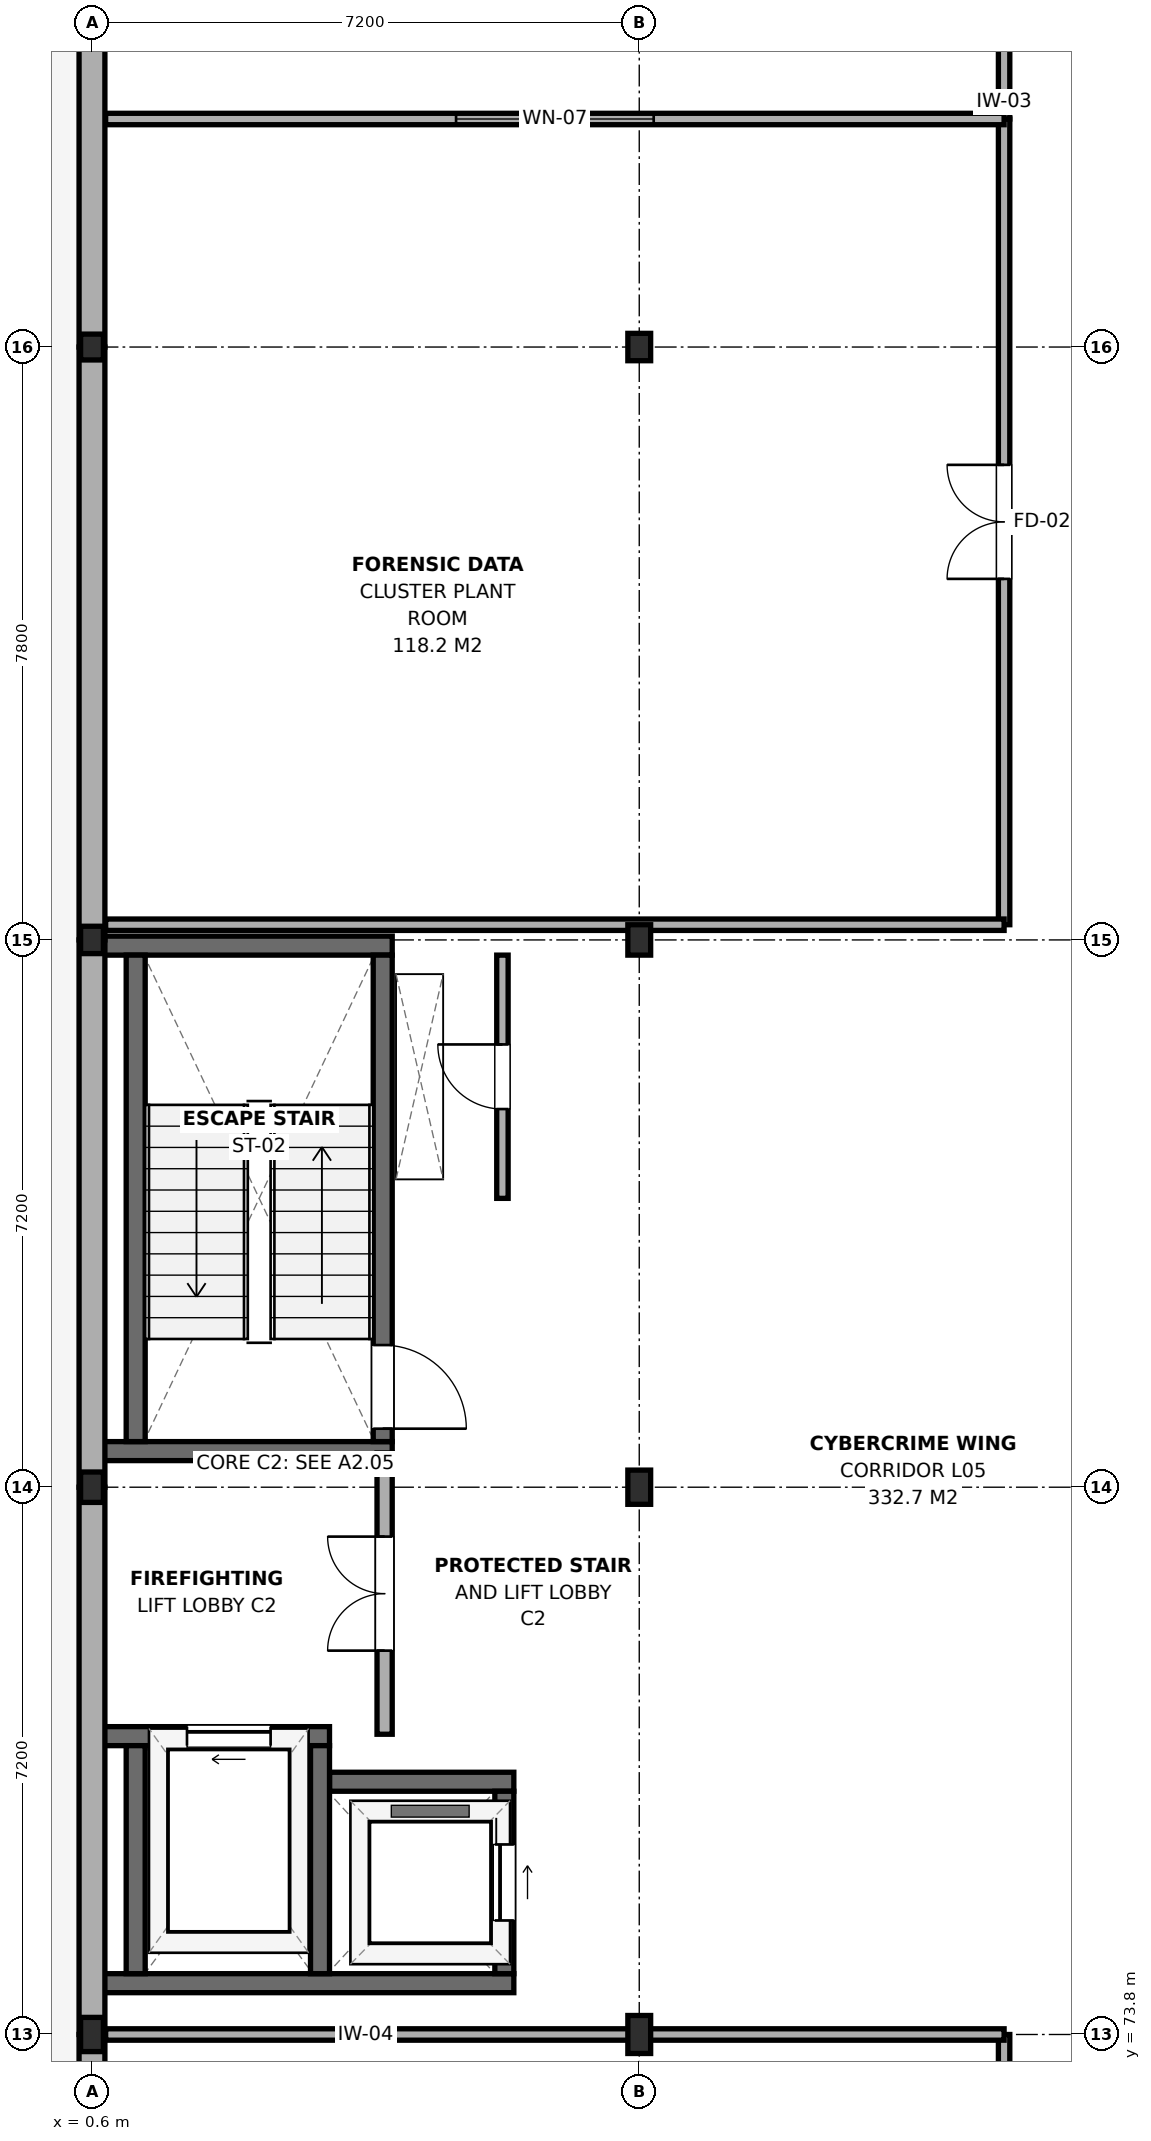
"""IFC4 building model, lengths in metres.
Left out: names, types, materials, properties, quantities, classifications, styles, units other than length and angle.
Written with IfcOpenShell. Run it as: python <this file> out.ifc"""

import sys

from ifc_helpers import new_model, si_unit, direction, frame, frame_2d, origin, origin_2d, place, context, subcontext, project, spatial, rectangle, i_section, extrude, element, fill, save


model = new_model("IFC4")
c1 = context("Model", 3, precision=1e-05, world=origin(), true_north=direction((0.0, 1.0)))
c2 = subcontext(c1, "Body", "Model", "MODEL_VIEW")
j1 = project(units=[si_unit("LENGTHUNIT", "METRE"), si_unit("PLANEANGLEUNIT", "RADIAN")], contexts=[c1])
p1 = place(None, origin())
s1 = spatial("IfcSite", under=j1, at=p1, CompositionType="ELEMENT")
p2 = place(p1, origin())
s2 = spatial("IfcBuilding", under=s1, at=p2, CompositionType="ELEMENT")
p3 = place(p2, frame((0.0, 0.0, 21.0)))
s3 = spatial("IfcBuildingStorey", under=s2, at=p3, CompositionType="ELEMENT", Elevation=21.0)
p4 = place(p3, frame((0.6, 73.8, 0.0), z_axis=(0.0, 0.0, 1.0), x_axis=(1.0, 0.0, 0.0)))
e1 = element("IfcColumn", 1, at=p4, inside=s3, PredefinedType="COLUMN", context=c2, shape_type="SweptSolid", body=[
    extrude(i_section(OverallWidth=0.3, OverallDepth=0.45, WebThickness=0.014, FlangeThickness=0.026, FilletRadius=0.027, at=origin_2d()), origin(), (0.0, 0.0, 1.0), 3.9),
])
p5 = place(p3, frame((0.6, 81.0, 0.0), z_axis=(0.0, 0.0, 1.0), x_axis=(1.0, 0.0, 0.0)))
e2 = element("IfcColumn", 2, at=p5, inside=s3, PredefinedType="COLUMN", context=c2, shape_type="SweptSolid", body=[
    extrude(i_section(OverallWidth=0.3, OverallDepth=0.4, WebThickness=0.013, FlangeThickness=0.024, FilletRadius=0.027, at=origin_2d()), origin(), (0.0, 0.0, 1.0), 3.9),
])
p6 = place(p3, frame((0.6, 88.2, 0.0), z_axis=(0.0, 0.0, 1.0), x_axis=(1.0, 0.0, 0.0)))
e3 = element("IfcColumn", 3, at=p6, inside=s3, PredefinedType="COLUMN", context=c2, shape_type="SweptSolid", body=[
    extrude(i_section(OverallWidth=0.3, OverallDepth=0.36, WebThickness=0.012, FlangeThickness=0.022, FilletRadius=0.027, at=origin_2d()), origin(), (0.0, 0.0, 1.0), 3.9),
])
p7 = place(p3, frame((0.6, 96.0, 0.0), z_axis=(0.0, 0.0, 1.0), x_axis=(1.0, 0.0, 0.0)))
e4 = element("IfcColumn", 4, at=p7, inside=s3, PredefinedType="COLUMN", context=c2, shape_type="SweptSolid", body=[
    extrude(i_section(OverallWidth=0.3, OverallDepth=0.34, WebThickness=0.012, FlangeThickness=0.021, FilletRadius=0.027, at=origin_2d()), origin(), (0.0, 0.0, 1.0), 3.9),
])
p8 = place(p3, frame((7.8, 73.8, 0.0), z_axis=(0.0, 0.0, 1.0), x_axis=(1.0, 0.0, 0.0)))
e5 = element("IfcColumn", 5, at=p8, inside=s3, PredefinedType="COLUMN", context=c2, shape_type="SweptSolid", body=[
    extrude(i_section(OverallWidth=0.3, OverallDepth=0.5, WebThickness=0.014, FlangeThickness=0.028, FilletRadius=0.027, at=origin_2d()), origin(), (0.0, 0.0, 1.0), 3.9),
])
p9 = place(p3, frame((7.8, 81.0, 0.0), z_axis=(0.0, 0.0, 1.0), x_axis=(1.0, 0.0, 0.0)))
e6 = element("IfcColumn", 6, at=p9, inside=s3, PredefinedType="COLUMN", context=c2, shape_type="SweptSolid", body=[
    extrude(i_section(OverallWidth=0.3, OverallDepth=0.45, WebThickness=0.014, FlangeThickness=0.026, FilletRadius=0.027, at=origin_2d()), origin(), (0.0, 0.0, 1.0), 3.9),
])
p10 = place(p3, frame((7.8, 88.2, 0.0), z_axis=(0.0, 0.0, 1.0), x_axis=(1.0, 0.0, 0.0)))
e7 = element("IfcColumn", 7, at=p10, inside=s3, PredefinedType="COLUMN", context=c2, shape_type="SweptSolid", body=[
    extrude(i_section(OverallWidth=0.3, OverallDepth=0.4, WebThickness=0.013, FlangeThickness=0.024, FilletRadius=0.027, at=origin_2d()), origin(), (0.0, 0.0, 1.0), 3.9),
])
p11 = place(p3, frame((7.8, 96.0, 0.0), z_axis=(0.0, 0.0, 1.0), x_axis=(1.0, 0.0, 0.0)))
e8 = element("IfcColumn", 8, at=p11, inside=s3, PredefinedType="COLUMN", context=c2, shape_type="SweptSolid", body=[
    extrude(i_section(OverallWidth=0.3, OverallDepth=0.36, WebThickness=0.012, FlangeThickness=0.022, FilletRadius=0.027, at=origin_2d()), origin(), (0.0, 0.0, 1.0), 3.9),
])
for number, where, z_axis, x_axis in (
    (9, (0.75, 81.475, 0.0), (0.0, 0.0, 1.0), (1.0, 0.0, 0.0)),
    (10, (0.75, 88.125, 0.0), (0.0, 0.0, 1.0), (1.0, 0.0, 0.0)),
):
    element("IfcWall", number, at=place(p3, frame(where, z_axis=z_axis, x_axis=x_axis)), inside=s3, PredefinedType="SHEAR", context=c2, shape_type="SweptSolid", body=[
        extrude(rectangle(XDim=3.8, YDim=0.25, at=frame_2d((1.9, 0.0))), origin(), (0.0, 0.0, 1.0), 3.7),
    ])
p12 = place(p3, frame((1.175, 81.6, 0.0), z_axis=(0.0, 0.0, 1.0), x_axis=(0.0, 1.0, 0.0)))
e11 = element("IfcWall", 11, at=p12, inside=s3, PredefinedType="SHEAR", context=c2, shape_type="SweptSolid", body=[
    extrude(rectangle(XDim=6.4, YDim=0.25, at=frame_2d((3.2, 0.0))), origin(), (0.0, 0.0, 1.0), 3.7),
])
p13 = place(p3, frame((4.425, 81.6, 0.0), z_axis=(0.0, 0.0, 1.0), x_axis=(0.0, 1.0, 0.0)))
e12 = element("IfcWall", 12, at=p13, inside=s3, PredefinedType="SHEAR", context=c2, shape_type="SweptSolid", body=[
    extrude(rectangle(XDim=6.4, YDim=0.25, at=frame_2d((3.2, 0.0))), origin(), (0.0, 0.0, 1.0), 3.7),
])
p14 = place(p13, frame((0.17, 0.0, 0.0)))
e13 = element("IfcOpeningElement", 13, at=p14, cuts=e12, PredefinedType="OPENING", context=c2, shape_type="SweptSolid", body=[
    extrude(rectangle(XDim=1.1, YDim=2.15, at=frame_2d((0.55, 1.075))), frame((0.0, 0.14, 0.0), z_axis=(0.0, -1.0, 0.0), x_axis=(1.0, 0.0, 0.0)), (0.0, 0.0, 1.0), 0.28),
])
p15 = place(p3, frame((0.75, 74.475, 0.0), z_axis=(0.0, 0.0, 1.0), x_axis=(1.0, 0.0, 0.0)))
e14 = element("IfcWall", 14, at=p15, inside=s3, PredefinedType="SHEAR", context=c2, shape_type="SweptSolid", body=[
    extrude(rectangle(XDim=5.4, YDim=0.25, at=frame_2d((2.7, 0.0))), origin(), (0.0, 0.0, 1.0), 3.7),
])
p16 = place(p3, frame((0.75, 77.725, 0.0), z_axis=(0.0, 0.0, 1.0), x_axis=(1.0, 0.0, 0.0)))
e15 = element("IfcWall", 15, at=p16, inside=s3, PredefinedType="SHEAR", context=c2, shape_type="SweptSolid", body=[
    extrude(rectangle(XDim=2.975, YDim=0.25, at=frame_2d((1.488, 0.0))), origin(), (0.0, 0.0, 1.0), 3.7),
])
p17 = place(p16, frame((1.1, 0.0, 0.0)))
e16 = element("IfcOpeningElement", 16, at=p17, cuts=e15, PredefinedType="OPENING", context=c2, shape_type="SweptSolid", body=[
    extrude(rectangle(XDim=1.1, YDim=2.15, at=frame_2d((0.55, 1.075))), frame((0.0, 0.14, 0.0), z_axis=(0.0, -1.0, 0.0), x_axis=(1.0, 0.0, 0.0)), (0.0, 0.0, 1.0), 0.28),
])
p18 = place(p3, frame((3.725, 77.125, 0.0), z_axis=(0.0, 0.0, 1.0), x_axis=(1.0, 0.0, 0.0)))
e17 = element("IfcWall", 17, at=p18, inside=s3, PredefinedType="SHEAR", context=c2, shape_type="SweptSolid", body=[
    extrude(rectangle(XDim=2.425, YDim=0.25, at=frame_2d((1.212, 0.0))), origin(), (0.0, 0.0, 1.0), 3.7),
])
for number, where, z_axis, x_axis in (
    (18, (1.175, 74.6, 0.0), (0.0, 0.0, 1.0), (0.0, 1.0, 0.0)),
    (19, (3.6, 74.6, 0.0), (0.0, 0.0, 1.0), (0.0, 1.0, 0.0)),
):
    element("IfcWall", number, at=place(p3, frame(where, z_axis=z_axis, x_axis=x_axis)), inside=s3, PredefinedType="SHEAR", context=c2, shape_type="SweptSolid", body=[
        extrude(rectangle(XDim=3.0, YDim=0.25, at=frame_2d((1.5, 0.0))), origin(), (0.0, 0.0, 1.0), 3.7),
    ])
p19 = place(p3, frame((6.025, 74.6, 0.0), z_axis=(0.0, 0.0, 1.0), x_axis=(0.0, 1.0, 0.0)))
e20 = element("IfcWall", 20, at=p19, inside=s3, PredefinedType="SHEAR", context=c2, shape_type="SweptSolid", body=[
    extrude(rectangle(XDim=2.4, YDim=0.25, at=frame_2d((1.2, 0.0))), origin(), (0.0, 0.0, 1.0), 3.7),
])
p20 = place(p19, frame((0.7, 0.0, 0.0)))
e21 = element("IfcOpeningElement", 21, at=p20, cuts=e20, PredefinedType="OPENING", context=c2, shape_type="SweptSolid", body=[
    extrude(rectangle(XDim=1.0, YDim=2.15, at=frame_2d((0.5, 1.075))), frame((0.0, 0.14, 0.0), z_axis=(0.0, -1.0, 0.0), x_axis=(1.0, 0.0, 0.0)), (0.0, 0.0, 1.0), 0.28),
])
p21 = place(p3, frame((0.6, 66.6, 0.0), z_axis=(0.0, 0.0, 1.0), x_axis=(0.0, 1.0, 0.0)))
e22 = element("IfcWall", 22, at=p21, inside=s3, PredefinedType="SOLIDWALL", context=c2, shape_type="SweptSolid", body=[
    extrude(rectangle(XDim=7.2, YDim=0.34, at=frame_2d((3.6, 0.0))), origin(), (0.0, 0.0, 1.0), 3.095),
])
p22 = place(p21, frame((2.6, 0.0, 0.9)))
e23 = element("IfcOpeningElement", 23, at=p22, cuts=e22, PredefinedType="OPENING", context=c2, shape_type="SweptSolid", body=[
    extrude(rectangle(XDim=2.0, YDim=1.8, at=frame_2d((1.0, 0.9))), frame((0.0, 0.185, 0.0), z_axis=(0.0, -1.0, 0.0), x_axis=(1.0, 0.0, 0.0)), (0.0, 0.0, 1.0), 0.37),
])
for number, where, z_axis, x_axis in (
    (24, (0.6, 73.8, 0.0), (0.0, 0.0, 1.0), (0.0, 1.0, 0.0)),
    (25, (0.6, 81.0, 0.0), (0.0, 0.0, 1.0), (0.0, 1.0, 0.0)),
):
    element("IfcWall", number, at=place(p3, frame(where, z_axis=z_axis, x_axis=x_axis)), inside=s3, PredefinedType="SOLIDWALL", context=c2, shape_type="SweptSolid", body=[
        extrude(rectangle(XDim=7.2, YDim=0.34, at=frame_2d((3.6, 0.0))), origin(), (0.0, 0.0, 1.0), 3.095),
    ])
p23 = place(p3, frame((0.6, 88.2, 0.0), z_axis=(0.0, 0.0, 1.0), x_axis=(0.0, 1.0, 0.0)))
e26 = element("IfcWall", 26, at=p23, inside=s3, PredefinedType="SOLIDWALL", context=c2, shape_type="SweptSolid", body=[
    extrude(rectangle(XDim=7.8, YDim=0.34, at=frame_2d((3.9, 0.0))), origin(), (0.0, 0.0, 1.0), 3.145),
])
p24 = place(p3, frame((0.6, 96.0, 0.0), z_axis=(0.0, 0.0, 1.0), x_axis=(0.0, 1.0, 0.0)))
e27 = element("IfcWall", 27, at=p24, inside=s3, PredefinedType="SOLIDWALL", context=c2, shape_type="SweptSolid", body=[
    extrude(rectangle(XDim=8.4, YDim=0.34, at=frame_2d((4.2, 0.0))), origin(), (0.0, 0.0, 1.0), 3.105),
])
p25 = place(p3, frame((4.45, 77.75, 0.0), z_axis=(0.0, 0.0, 1.0), x_axis=(0.0, 1.0, 0.0)))
e28 = element("IfcWall", 28, at=p25, inside=s3, PredefinedType="PARTITIONING", context=c2, shape_type="SweptSolid", body=[
    extrude(rectangle(XDim=3.7, YDim=0.2, at=frame_2d((1.85, 0.0))), origin(), (0.0, 0.0, 1.0), 3.195),
])
p26 = place(p25, frame((1.1, 0.0, 0.0)))
e29 = element("IfcOpeningElement", 29, at=p26, cuts=e28, PredefinedType="OPENING", context=c2, shape_type="SweptSolid", body=[
    extrude(rectangle(XDim=1.5, YDim=2.15, at=frame_2d((0.75, 1.075))), frame((0.0, 0.115, 0.0), z_axis=(0.0, -1.0, 0.0), x_axis=(1.0, 0.0, 0.0)), (0.0, 0.0, 1.0), 0.23),
])
p27 = place(p3, frame((6.0, 84.8, 0.0), z_axis=(0.0, 0.0, 1.0), x_axis=(0.0, 1.0, 0.0)))
e30 = element("IfcWall", 30, at=p27, inside=s3, PredefinedType="PARTITIONING", context=c2, shape_type="SweptSolid", body=[
    extrude(rectangle(XDim=3.2, YDim=0.15, at=frame_2d((1.6, 0.0))), origin(), (0.0, 0.0, 1.0), 3.365),
])
p28 = place(p27, frame((1.175, 0.0, 0.0)))
e31 = element("IfcOpeningElement", 31, at=p28, cuts=e30, PredefinedType="OPENING", context=c2, shape_type="SweptSolid", body=[
    extrude(rectangle(XDim=0.85, YDim=2.1, at=frame_2d((0.425, 1.05))), frame((0.0, 0.09, 0.0), z_axis=(0.0, -1.0, 0.0), x_axis=(1.0, 0.0, 0.0)), (0.0, 0.0, 1.0), 0.18),
])
p29 = place(p3, frame((12.6, 40.0, 0.0), z_axis=(0.0, 0.0, 1.0), x_axis=(0.0, 1.0, 0.0)))
e32 = element("IfcWall", 32, at=p29, inside=s3, PredefinedType="PARTITIONING", context=c2, shape_type="SweptSolid", body=[
    extrude(rectangle(XDim=33.8, YDim=0.15, at=frame_2d((16.9, 0.0))), origin(), (0.0, 0.0, 1.0), 3.095),
])
p30 = place(p29, frame((16.1, 0.0, 0.0)))
e33 = element("IfcOpeningElement", 33, at=p30, cuts=e32, PredefinedType="OPENING", context=c2, shape_type="SweptSolid", body=[
    extrude(rectangle(XDim=1.6, YDim=2.15, at=frame_2d((0.8, 1.075))), frame((0.0, 0.09, 0.0), z_axis=(0.0, -1.0, 0.0), x_axis=(1.0, 0.0, 0.0)), (0.0, 0.0, 1.0), 0.18),
])
p31 = place(p29, frame((7.15, 0.0, 0.95)))
e34 = element("IfcOpeningElement", 34, at=p31, cuts=e32, PredefinedType="OPENING", context=c2, shape_type="SweptSolid", body=[
    extrude(rectangle(XDim=2.6, YDim=1.5, at=frame_2d((1.3, 0.75))), frame((0.0, 0.09, 0.0), z_axis=(0.0, -1.0, 0.0), x_axis=(1.0, 0.0, 0.0)), (0.0, 0.0, 1.0), 0.18),
])
p32 = place(p29, frame((24.05, 0.0, 0.95)))
e35 = element("IfcOpeningElement", 35, at=p32, cuts=e32, PredefinedType="OPENING", context=c2, shape_type="SweptSolid", body=[
    extrude(rectangle(XDim=2.6, YDim=1.5, at=frame_2d((1.3, 0.75))), frame((0.0, 0.09, 0.0), z_axis=(0.0, -1.0, 0.0), x_axis=(1.0, 0.0, 0.0)), (0.0, 0.0, 1.0), 0.18),
])
p33 = place(p3, frame((0.78, 73.8, 0.0), z_axis=(0.0, 0.0, 1.0), x_axis=(1.0, 0.0, 0.0)))
e36 = element("IfcWall", 36, at=p33, inside=s3, PredefinedType="PARTITIONING", context=c2, shape_type="SweptSolid", body=[
    extrude(rectangle(XDim=11.82, YDim=0.15, at=frame_2d((5.91, 0.0))), origin(), (0.0, 0.0, 1.0), 3.095),
])
p34 = place(p3, frame((12.6, 88.4, 0.0), z_axis=(0.0, 0.0, 1.0), x_axis=(0.0, 1.0, 0.0)))
e37 = element("IfcWall", 37, at=p34, inside=s3, PredefinedType="PARTITIONING", context=c2, shape_type="SweptSolid", body=[
    extrude(rectangle(XDim=10.6, YDim=0.15, at=frame_2d((5.3, 0.0))), origin(), (0.0, 0.0, 1.0), 3.095),
])
p35 = place(p34, frame((4.55, 0.0, 0.0)))
e38 = element("IfcOpeningElement", 38, at=p35, cuts=e37, PredefinedType="OPENING", context=c2, shape_type="SweptSolid", body=[
    extrude(rectangle(XDim=1.5, YDim=2.15, at=frame_2d((0.75, 1.075))), frame((0.0, 0.09, 0.0), z_axis=(0.0, -1.0, 0.0), x_axis=(1.0, 0.0, 0.0)), (0.0, 0.0, 1.0), 0.18),
])
p36 = place(p3, frame((0.78, 88.4, 0.0), z_axis=(0.0, 0.0, 1.0), x_axis=(1.0, 0.0, 0.0)))
e39 = element("IfcWall", 39, at=p36, inside=s3, PredefinedType="PARTITIONING", context=c2, shape_type="SweptSolid", body=[
    extrude(rectangle(XDim=11.82, YDim=0.15, at=frame_2d((5.91, 0.0))), origin(), (0.0, 0.0, 1.0), 3.095),
])
p37 = place(p3, frame((12.6, 99.0, 0.0), z_axis=(0.0, 0.0, 1.0), x_axis=(0.0, 1.0, 0.0)))
e40 = element("IfcWall", 40, at=p37, inside=s3, PredefinedType="PARTITIONING", context=c2, shape_type="SweptSolid", body=[
    extrude(rectangle(XDim=11.0, YDim=0.15, at=frame_2d((5.5, 0.0))), origin(), (0.0, 0.0, 1.0), 3.095),
])
p38 = place(p37, frame((4.975, 0.0, 0.0)))
e41 = element("IfcOpeningElement", 41, at=p38, cuts=e40, PredefinedType="OPENING", context=c2, shape_type="SweptSolid", body=[
    extrude(rectangle(XDim=1.05, YDim=2.15, at=frame_2d((0.525, 1.075))), frame((0.0, 0.09, 0.0), z_axis=(0.0, -1.0, 0.0), x_axis=(1.0, 0.0, 0.0)), (0.0, 0.0, 1.0), 0.18),
])
p39 = place(p37, frame((6.62, 0.0, 0.95)))
e42 = element("IfcOpeningElement", 42, at=p39, cuts=e40, PredefinedType="OPENING", context=c2, shape_type="SweptSolid", body=[
    extrude(rectangle(XDim=2.6, YDim=1.5, at=frame_2d((1.3, 0.75))), frame((0.0, 0.09, 0.0), z_axis=(0.0, -1.0, 0.0), x_axis=(1.0, 0.0, 0.0)), (0.0, 0.0, 1.0), 0.18),
])
p40 = place(p3, frame((0.78, 99.0, 0.0), z_axis=(0.0, 0.0, 1.0), x_axis=(1.0, 0.0, 0.0)))
e43 = element("IfcWall", 43, at=p40, inside=s3, PredefinedType="PARTITIONING", context=c2, shape_type="SweptSolid", body=[
    extrude(rectangle(XDim=11.82, YDim=0.15, at=frame_2d((5.91, 0.0))), origin(), (0.0, 0.0, 1.0), 3.255),
])
p41 = place(p40, frame((4.61, 0.0, 0.95)))
e44 = element("IfcOpeningElement", 44, at=p41, cuts=e43, PredefinedType="OPENING", context=c2, shape_type="SweptSolid", body=[
    extrude(rectangle(XDim=2.6, YDim=1.5, at=frame_2d((1.3, 0.75))), frame((0.0, 0.09, 0.0), z_axis=(0.0, -1.0, 0.0), x_axis=(1.0, 0.0, 0.0)), (0.0, 0.0, 1.0), 0.18),
])
p42 = place(p14, frame((1.1, 0.0, 0.0), z_axis=(0.0, 0.0, 1.0), x_axis=(-1.0, 0.0, 0.0)))
e45 = element("IfcDoor", 45, at=p42, inside=s3, OperationType="SINGLE_SWING_RIGHT", PredefinedType="DOOR", context=c2, shape_type="SweptSolid", body=[
    extrude(rectangle(XDim=1.1, YDim=2.15, at=frame_2d((0.55, 1.075))), frame((0.0, 0.025, 0.0), z_axis=(0.0, -1.0, 0.0), x_axis=(1.0, 0.0, 0.0)), (0.0, 0.0, 1.0), 0.05),
])
fill(e13, e45)
p43 = place(p17, origin())
e46 = element("IfcDoor", 46, at=p43, inside=s3, OperationType="SLIDING_TO_LEFT", PredefinedType="DOOR", context=c2, shape_type="SweptSolid", body=[
    extrude(rectangle(XDim=1.1, YDim=2.15, at=frame_2d((0.55, 1.075))), frame((0.0, 0.025, 0.0), z_axis=(0.0, -1.0, 0.0), x_axis=(1.0, 0.0, 0.0)), (0.0, 0.0, 1.0), 0.05),
])
fill(e16, e46)
p44 = place(p20, frame((1.0, 0.0, 0.0), z_axis=(0.0, 0.0, 1.0), x_axis=(-1.0, 0.0, 0.0)))
e47 = element("IfcDoor", 47, at=p44, inside=s3, OperationType="SLIDING_TO_RIGHT", PredefinedType="DOOR", context=c2, shape_type="SweptSolid", body=[
    extrude(rectangle(XDim=1.0, YDim=2.15, at=frame_2d((0.5, 1.075))), frame((0.0, 0.025, 0.0), z_axis=(0.0, -1.0, 0.0), x_axis=(1.0, 0.0, 0.0)), (0.0, 0.0, 1.0), 0.05),
])
fill(e21, e47)
p45 = place(p26, origin())
e48 = element("IfcDoor", 48, at=p45, inside=s3, OperationType="DOUBLE_DOOR_SINGLE_SWING", PredefinedType="DOOR", context=c2, shape_type="SweptSolid", body=[
    extrude(rectangle(XDim=1.5, YDim=2.15, at=frame_2d((0.75, 1.075))), frame((0.0, 0.025, 0.0), z_axis=(0.0, -1.0, 0.0), x_axis=(1.0, 0.0, 0.0)), (0.0, 0.0, 1.0), 0.05),
])
fill(e29, e48)
p46 = place(p28, origin())
e49 = element("IfcDoor", 49, at=p46, inside=s3, OperationType="SINGLE_SWING_RIGHT", PredefinedType="DOOR", context=c2, shape_type="SweptSolid", body=[
    extrude(rectangle(XDim=0.85, YDim=2.1, at=frame_2d((0.425, 1.05))), frame((0.0, 0.025, 0.0), z_axis=(0.0, -1.0, 0.0), x_axis=(1.0, 0.0, 0.0)), (0.0, 0.0, 1.0), 0.05),
])
fill(e31, e49)
p47 = place(p35, origin())
e50 = element("IfcDoor", 50, at=p47, inside=s3, OperationType="DOUBLE_DOOR_SINGLE_SWING", PredefinedType="DOOR", context=c2, shape_type="SweptSolid", body=[
    extrude(rectangle(XDim=1.5, YDim=2.15, at=frame_2d((0.75, 1.075))), frame((0.0, 0.025, 0.0), z_axis=(0.0, -1.0, 0.0), x_axis=(1.0, 0.0, 0.0)), (0.0, 0.0, 1.0), 0.05),
])
fill(e38, e50)
p48 = place(p41, origin())
e51 = element("IfcWindow", 51, at=p48, inside=s3, PartitioningType="SINGLE_PANEL", PredefinedType="WINDOW", context=c2, shape_type="SweptSolid", body=[
    extrude(rectangle(XDim=2.6, YDim=1.5, at=frame_2d((1.3, 0.75))), frame((0.0, 0.03, 0.0), z_axis=(0.0, -1.0, 0.0), x_axis=(1.0, 0.0, 0.0)), (0.0, 0.0, 1.0), 0.06),
])
fill(e44, e51)
save(model, sys.argv[1])
